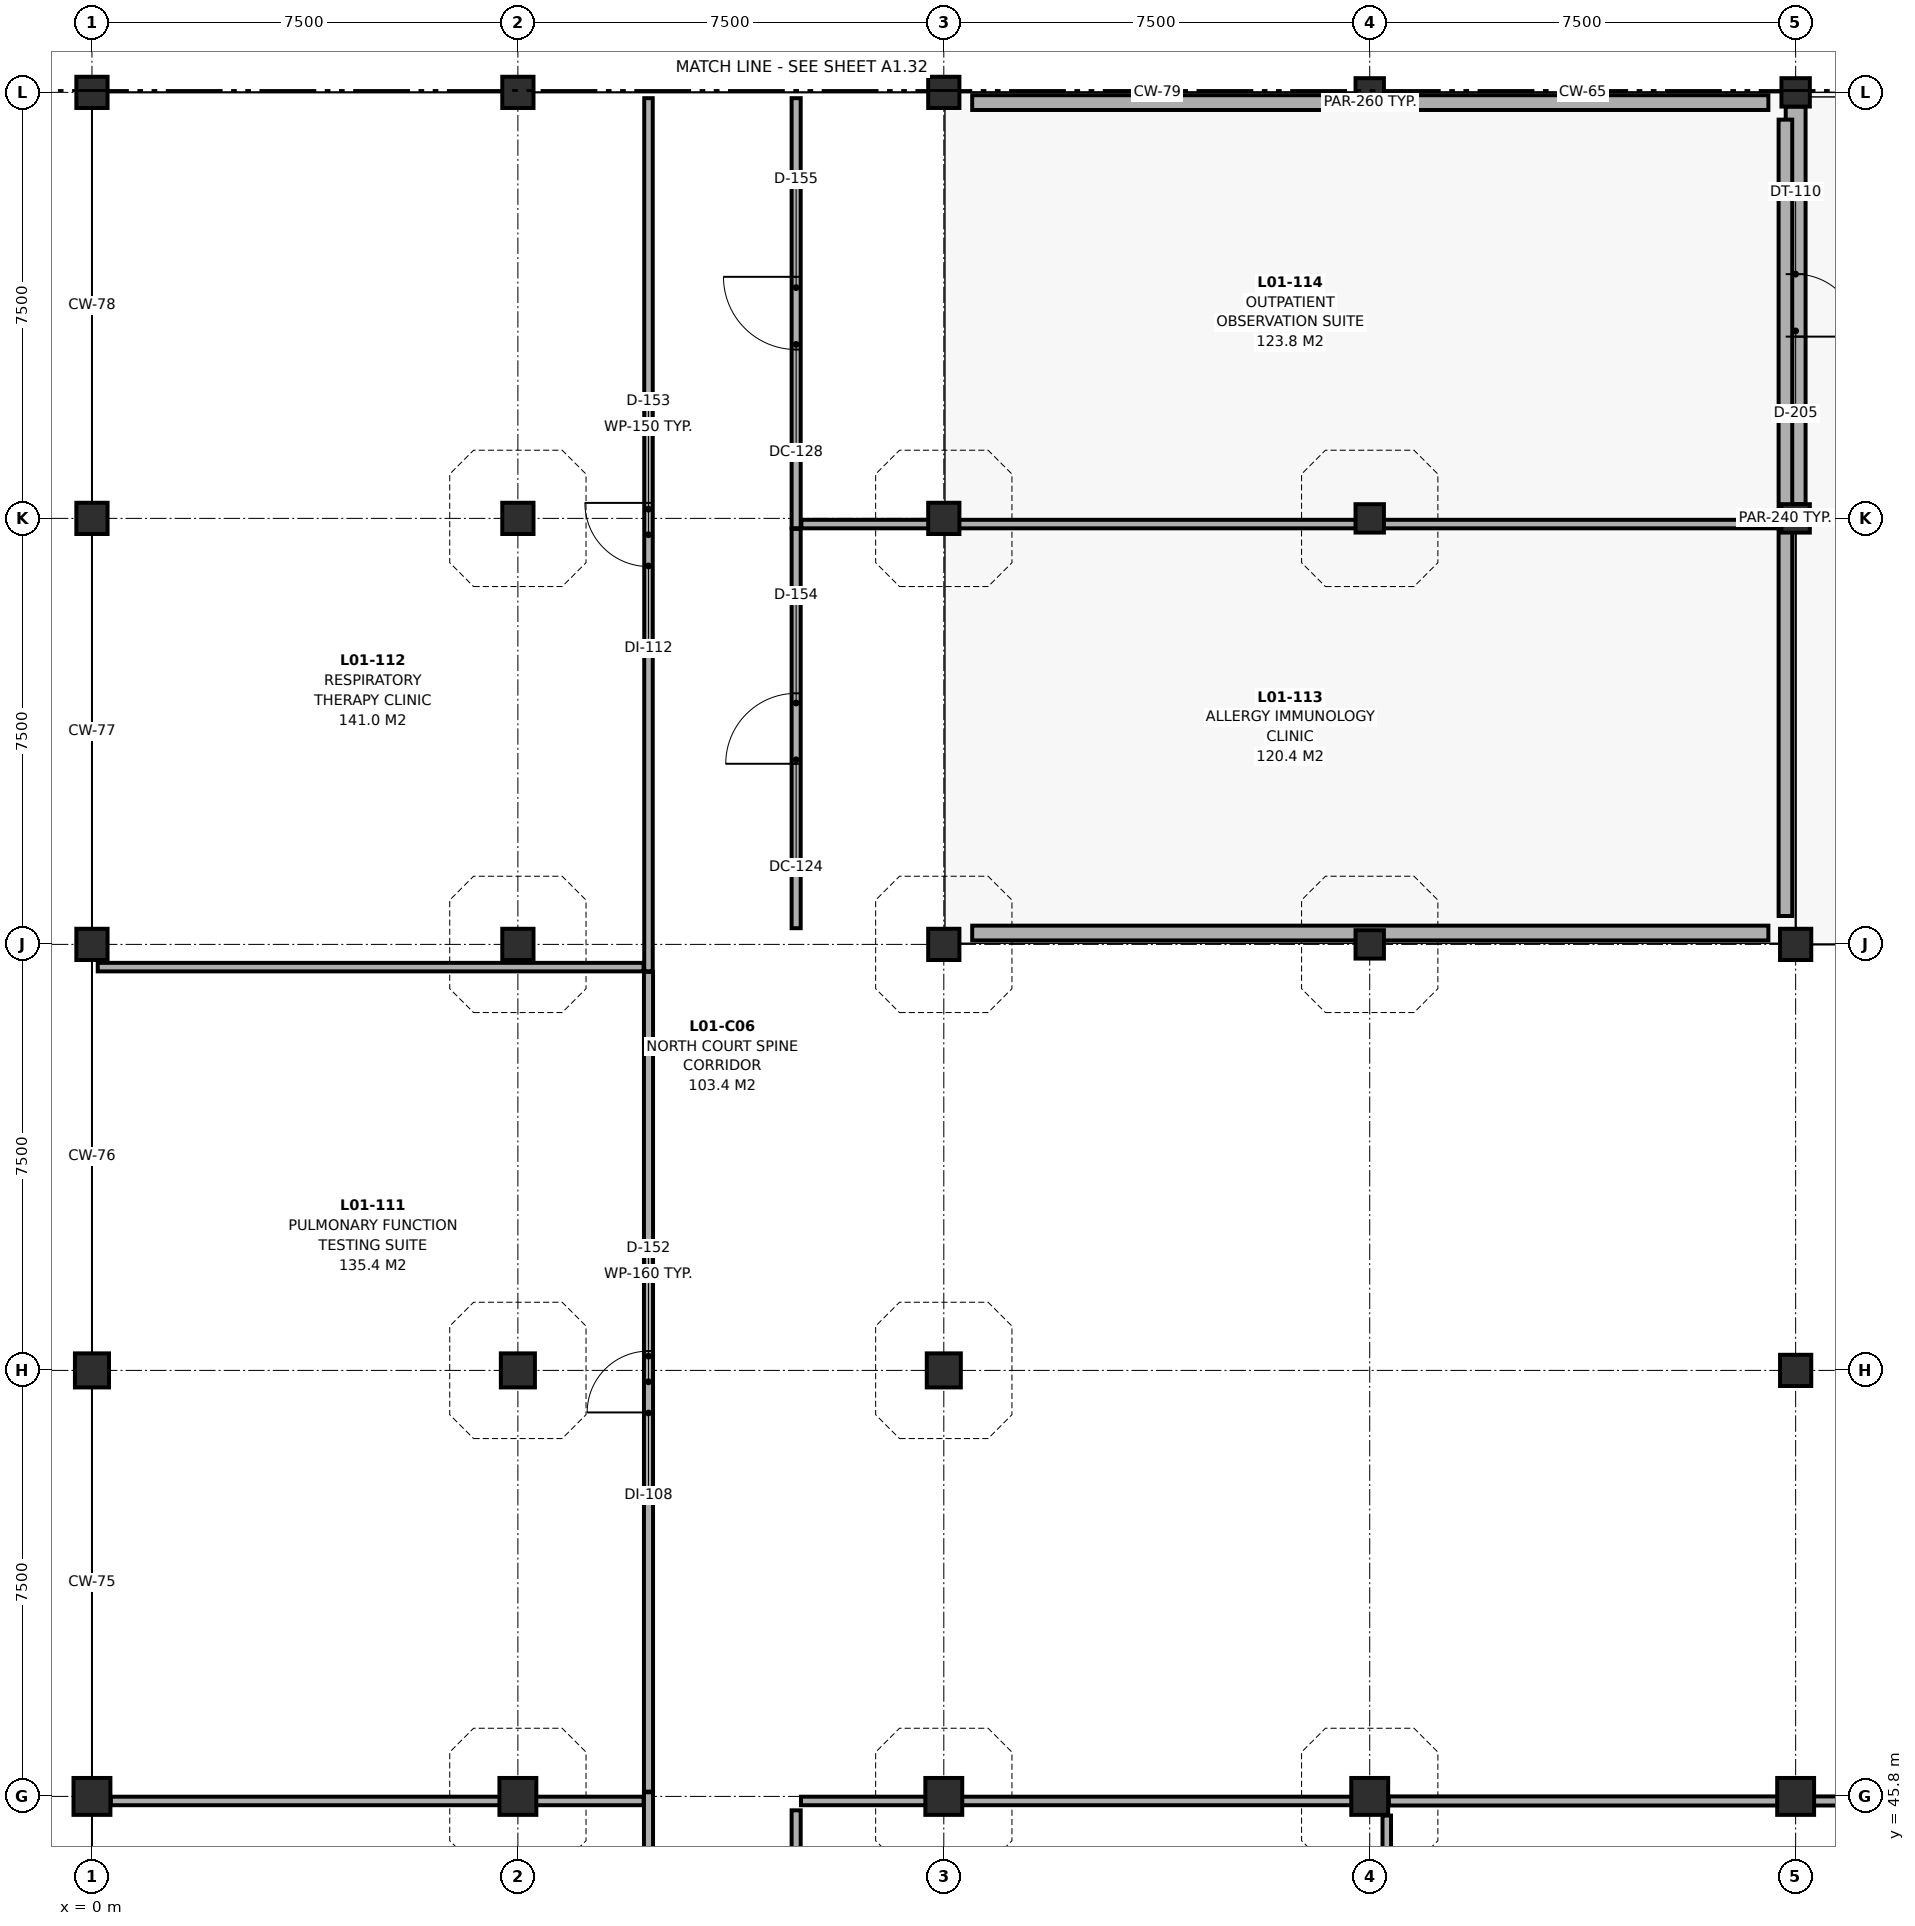
"""IFC4 building model, lengths in metres.
Left out: names, types, materials, properties, quantities, classifications, styles, units other than length and angle.
Written with IfcOpenShell. Run it as: python <this file> out.ifc"""

import sys

from ifc_helpers import new_model, si_unit, direction, frame, frame_2d, origin, origin_2d, place, context, subcontext, project, spatial, rectangle, extrude, element, fill, save


model = new_model("IFC4")
c1 = context("Model", 3, precision=1e-05, world=origin(), true_north=direction((0.0, 1.0)))
c2 = subcontext(c1, "Body", "Model", "MODEL_VIEW")
j1 = project(units=[si_unit("LENGTHUNIT", "METRE"), si_unit("PLANEANGLEUNIT", "RADIAN")], contexts=[c1])
p1 = place(None, origin())
s1 = spatial("IfcSite", under=j1, at=p1, CompositionType="ELEMENT")
p2 = place(p1, origin())
s2 = spatial("IfcBuilding", under=s1, at=p2, CompositionType="ELEMENT")
p3 = place(p2, frame((0.0, 0.0, 5.0)))
s3 = spatial("IfcBuildingStorey", under=s2, at=p3, CompositionType="ELEMENT", Elevation=5.0)
p4 = place(p3, frame((0.0, 45.8, 0.0), z_axis=(0.0, 0.0, 1.0), x_axis=(1.0, 0.0, 0.0)))
e1 = element("IfcColumn", 1, at=p4, inside=s3, PredefinedType="COLUMN", context=c2, shape_type="SweptSolid", body=[
    extrude(rectangle(XDim=0.65, YDim=0.65, at=origin_2d()), origin(), (0.0, 0.0, 1.0), 4.2),
])
p5 = place(p3, frame((0.0, 53.3, 0.0), z_axis=(0.0, 0.0, 1.0), x_axis=(1.0, 0.0, 0.0)))
e2 = element("IfcColumn", 2, at=p5, inside=s3, PredefinedType="COLUMN", context=c2, shape_type="SweptSolid", body=[
    extrude(rectangle(XDim=0.6, YDim=0.6, at=origin_2d()), origin(), (0.0, 0.0, 1.0), 4.2),
])
p6 = place(p3, frame((0.0, 60.8, 0.0), z_axis=(0.0, 0.0, 1.0), x_axis=(1.0, 0.0, 0.0)))
e3 = element("IfcColumn", 3, at=p6, inside=s3, PredefinedType="COLUMN", context=c2, shape_type="SweptSolid", body=[
    extrude(rectangle(XDim=0.55, YDim=0.55, at=origin_2d()), origin(), (0.0, 0.0, 1.0), 4.2),
])
for number, where, z_axis, x_axis in (
    (4, (0.0, 68.3, 0.0), (0.0, 0.0, 1.0), (1.0, 0.0, 0.0)),
    (5, (0.0, 75.8, 0.0), (0.0, 0.0, 1.0), (1.0, 0.0, 0.0)),
):
    element("IfcColumn", number, at=place(p3, frame(where, z_axis=z_axis, x_axis=x_axis)), inside=s3, PredefinedType="COLUMN", context=c2, shape_type="SweptSolid", body=[
        extrude(rectangle(XDim=0.55, YDim=0.55, at=origin_2d()), origin(), (0.0, 0.0, 1.0), 4.25),
    ])
p7 = place(p3, frame((7.5, 45.8, 0.0), z_axis=(0.0, 0.0, 1.0), x_axis=(1.0, 0.0, 0.0)))
e6 = element("IfcColumn", 6, at=p7, inside=s3, PredefinedType="COLUMN", context=c2, shape_type="SweptSolid", body=[
    extrude(rectangle(XDim=0.65, YDim=0.65, at=origin_2d()), origin(), (0.0, 0.0, 1.0), 4.2),
])
p8 = place(p3, frame((7.5, 53.3, 0.0), z_axis=(0.0, 0.0, 1.0), x_axis=(1.0, 0.0, 0.0)))
e7 = element("IfcColumn", 7, at=p8, inside=s3, PredefinedType="COLUMN", context=c2, shape_type="SweptSolid", body=[
    extrude(rectangle(XDim=0.6, YDim=0.6, at=origin_2d()), origin(), (0.0, 0.0, 1.0), 4.2),
])
p9 = place(p3, frame((7.5, 60.8, 0.0), z_axis=(0.0, 0.0, 1.0), x_axis=(1.0, 0.0, 0.0)))
e8 = element("IfcColumn", 8, at=p9, inside=s3, PredefinedType="COLUMN", context=c2, shape_type="SweptSolid", body=[
    extrude(rectangle(XDim=0.55, YDim=0.55, at=origin_2d()), origin(), (0.0, 0.0, 1.0), 4.2),
])
for number, where, z_axis, x_axis in (
    (9, (7.5, 68.3, 0.0), (0.0, 0.0, 1.0), (1.0, 0.0, 0.0)),
    (10, (7.5, 75.8, 0.0), (0.0, 0.0, 1.0), (1.0, 0.0, 0.0)),
):
    element("IfcColumn", number, at=place(p3, frame(where, z_axis=z_axis, x_axis=x_axis)), inside=s3, PredefinedType="COLUMN", context=c2, shape_type="SweptSolid", body=[
        extrude(rectangle(XDim=0.55, YDim=0.55, at=origin_2d()), origin(), (0.0, 0.0, 1.0), 4.25),
    ])
p10 = place(p3, frame((15.0, 45.8, 0.0), z_axis=(0.0, 0.0, 1.0), x_axis=(1.0, 0.0, 0.0)))
e11 = element("IfcColumn", 11, at=p10, inside=s3, PredefinedType="COLUMN", context=c2, shape_type="SweptSolid", body=[
    extrude(rectangle(XDim=0.65, YDim=0.65, at=origin_2d()), origin(), (0.0, 0.0, 1.0), 4.2),
])
p11 = place(p3, frame((15.0, 53.3, 0.0), z_axis=(0.0, 0.0, 1.0), x_axis=(1.0, 0.0, 0.0)))
e12 = element("IfcColumn", 12, at=p11, inside=s3, PredefinedType="COLUMN", context=c2, shape_type="SweptSolid", body=[
    extrude(rectangle(XDim=0.6, YDim=0.6, at=origin_2d()), origin(), (0.0, 0.0, 1.0), 4.2),
])
p12 = place(p3, frame((15.0, 60.8, 0.0), z_axis=(0.0, 0.0, 1.0), x_axis=(1.0, 0.0, 0.0)))
e13 = element("IfcColumn", 13, at=p12, inside=s3, PredefinedType="COLUMN", context=c2, shape_type="SweptSolid", body=[
    extrude(rectangle(XDim=0.55, YDim=0.55, at=origin_2d()), origin(), (0.0, 0.0, 1.0), 4.2),
])
for number, where, z_axis, x_axis in (
    (14, (15.0, 68.3, 0.0), (0.0, 0.0, 1.0), (1.0, 0.0, 0.0)),
    (15, (15.0, 75.8, 0.0), (0.0, 0.0, 1.0), (1.0, 0.0, 0.0)),
):
    element("IfcColumn", number, at=place(p3, frame(where, z_axis=z_axis, x_axis=x_axis)), inside=s3, PredefinedType="COLUMN", context=c2, shape_type="SweptSolid", body=[
        extrude(rectangle(XDim=0.55, YDim=0.55, at=origin_2d()), origin(), (0.0, 0.0, 1.0), 4.25),
    ])
p13 = place(p3, frame((22.5, 45.8, 0.0), z_axis=(0.0, 0.0, 1.0), x_axis=(1.0, 0.0, 0.0)))
e16 = element("IfcColumn", 16, at=p13, inside=s3, PredefinedType="COLUMN", context=c2, shape_type="SweptSolid", body=[
    extrude(rectangle(XDim=0.65, YDim=0.65, at=origin_2d()), origin(), (0.0, 0.0, 1.0), 4.2),
])
for number, where, z_axis, x_axis in (
    (17, (22.5, 60.8, 0.0), (0.0, 0.0, 1.0), (1.0, 0.0, 0.0)),
    (18, (22.5, 68.3, 0.0), (0.0, 0.0, 1.0), (1.0, 0.0, 0.0)),
    (19, (22.5, 75.8, 0.0), (0.0, 0.0, 1.0), (1.0, 0.0, 0.0)),
):
    element("IfcColumn", number, at=place(p3, frame(where, z_axis=z_axis, x_axis=x_axis)), inside=s3, PredefinedType="COLUMN", context=c2, shape_type="SweptSolid", body=[
        extrude(rectangle(XDim=0.5, YDim=0.5, at=origin_2d()), origin(), (0.0, 0.0, 1.0), 4.2),
    ])
p14 = place(p3, frame((30.0, 45.8, 0.0), z_axis=(0.0, 0.0, 1.0), x_axis=(1.0, 0.0, 0.0)))
e20 = element("IfcColumn", 20, at=p14, inside=s3, PredefinedType="COLUMN", context=c2, shape_type="SweptSolid", body=[
    extrude(rectangle(XDim=0.65, YDim=0.65, at=origin_2d()), origin(), (0.0, 0.0, 1.0), 4.2),
])
for number, where, z_axis, x_axis in (
    (21, (30.0, 53.3, 0.0), (0.0, 0.0, 1.0), (1.0, 0.0, 0.0)),
    (22, (30.0, 60.8, 0.0), (0.0, 0.0, 1.0), (1.0, 0.0, 0.0)),
):
    element("IfcColumn", number, at=place(p3, frame(where, z_axis=z_axis, x_axis=x_axis)), inside=s3, PredefinedType="COLUMN", context=c2, shape_type="SweptSolid", body=[
        extrude(rectangle(XDim=0.55, YDim=0.55, at=origin_2d()), origin(), (0.0, 0.0, 1.0), 4.2),
    ])
for number, where, z_axis, x_axis in (
    (23, (30.0, 68.3, 0.0), (0.0, 0.0, 1.0), (1.0, 0.0, 0.0)),
    (24, (30.0, 75.8, 0.0), (0.0, 0.0, 1.0), (1.0, 0.0, 0.0)),
):
    element("IfcColumn", number, at=place(p3, frame(where, z_axis=z_axis, x_axis=x_axis)), inside=s3, PredefinedType="COLUMN", context=c2, shape_type="SweptSolid", body=[
        extrude(rectangle(XDim=0.5, YDim=0.5, at=origin_2d()), origin(), (0.0, 0.0, 1.0), 4.2),
    ])
p15 = place(p3, frame((30.0, 75.55, 0.0), z_axis=(0.0, 0.0, 1.0), x_axis=(0.0, -1.0, 0.0)))
e25 = element("IfcWall", 25, at=p15, inside=s3, PredefinedType="SOLIDWALL", context=c2, shape_type="SweptSolid", body=[
    extrude(rectangle(XDim=7.0, YDim=0.35, at=frame_2d((3.5, 0.0))), origin(), (0.0, 0.0, 1.0), 4.2),
])
p16 = place(p15, frame((2.95, 0.0, 0.0)))
e26 = element("IfcOpeningElement", 26, at=p16, cuts=e25, PredefinedType="OPENING", context=c2, shape_type="SweptSolid", body=[
    extrude(rectangle(XDim=1.1, YDim=2.15, at=frame_2d((0.55, 1.075))), frame((0.0, 0.187, 0.0), z_axis=(0.0, -1.0, 0.0), x_axis=(1.0, 0.0, 0.0)), (0.0, 0.0, 1.0), 0.374),
])
p17 = place(p3, frame((15.5, 75.62, 4.4), z_axis=(0.0, 0.0, 1.0), x_axis=(1.0, 0.0, 0.0)))
e27 = element("IfcWall", 27, at=p17, inside=s3, PredefinedType="PARAPET", context=c2, shape_type="SweptSolid", body=[
    extrude(rectangle(XDim=14.02, YDim=0.26, at=frame_2d((7.01, 0.0))), origin(), (0.0, 0.0, 1.0), 0.6),
])
p18 = place(p3, frame((29.82, 75.32, 4.4), z_axis=(0.0, 0.0, 1.0), x_axis=(0.0, -1.0, 0.0)))
e28 = element("IfcWall", 28, at=p18, inside=s3, PredefinedType="PARAPET", context=c2, shape_type="SweptSolid", body=[
    extrude(rectangle(XDim=14.02, YDim=0.24, at=frame_2d((7.01, 0.0))), origin(), (0.0, 0.0, 1.0), 0.6),
])
p19 = place(p3, frame((29.52, 61.0, 4.4), z_axis=(0.0, 0.0, 1.0), x_axis=(-1.0, 0.0, 0.0)))
e29 = element("IfcWall", 29, at=p19, inside=s3, PredefinedType="PARAPET", context=c2, shape_type="SweptSolid", body=[
    extrude(rectangle(XDim=14.02, YDim=0.26, at=frame_2d((7.01, 0.0))), origin(), (0.0, 0.0, 1.0), 0.6),
])
p20 = place(p3, frame((9.8, 45.885, 0.0), z_axis=(0.0, 0.0, 1.0), x_axis=(0.0, 1.0, 0.0)))
e30 = element("IfcWall", 30, at=p20, inside=s3, PredefinedType="PARTITIONING", context=c2, shape_type="SweptSolid", body=[
    extrude(rectangle(XDim=14.43, YDim=0.16, at=frame_2d((7.215, 0.0))), origin(), (0.0, 0.0, 1.0), 3.265),
])
p21 = place(p20, frame((6.675, 0.0, 0.0)))
e31 = element("IfcOpeningElement", 31, at=p21, cuts=e30, PredefinedType="OPENING", context=c2, shape_type="SweptSolid", body=[
    extrude(rectangle(XDim=1.08, YDim=2.18, at=frame_2d((0.54, 1.09))), frame((0.0, 0.092, 0.0), z_axis=(0.0, -1.0, 0.0), x_axis=(1.0, 0.0, 0.0)), (0.0, 0.0, 1.0), 0.184),
])
p22 = place(p3, frame((9.8, 60.327, 0.0), z_axis=(0.0, 0.0, 1.0), x_axis=(0.0, 1.0, 0.0)))
e32 = element("IfcWall", 32, at=p22, inside=s3, PredefinedType="PARTITIONING", context=c2, shape_type="SweptSolid", body=[
    extrude(rectangle(XDim=15.371, YDim=0.15, at=frame_2d((7.686, 0.0))), origin(), (0.0, 0.0, 1.0), 3.265),
])
p23 = place(p22, frame((7.125, 0.0, 0.0)))
e33 = element("IfcOpeningElement", 33, at=p23, cuts=e32, PredefinedType="OPENING", context=c2, shape_type="SweptSolid", body=[
    extrude(rectangle(XDim=1.12, YDim=2.2, at=frame_2d((0.56, 1.1))), frame((0.0, 0.087, 0.0), z_axis=(0.0, -1.0, 0.0), x_axis=(1.0, 0.0, 0.0)), (0.0, 0.0, 1.0), 0.174),
])
p24 = place(p3, frame((12.4, 61.085, 0.0), z_axis=(0.0, 0.0, 1.0), x_axis=(0.0, 1.0, 0.0)))
e34 = element("IfcWall", 34, at=p24, inside=s3, PredefinedType="PARTITIONING", context=c2, shape_type="SweptSolid", body=[
    extrude(rectangle(XDim=7.03, YDim=0.16, at=frame_2d((3.515, 0.0))), origin(), (0.0, 0.0, 1.0), 3.265),
])
p25 = place(p24, frame((2.895, 0.0, 0.0)))
e35 = element("IfcOpeningElement", 35, at=p25, cuts=e34, PredefinedType="OPENING", context=c2, shape_type="SweptSolid", body=[
    extrude(rectangle(XDim=1.24, YDim=2.2, at=frame_2d((0.62, 1.1))), frame((0.0, 0.092, 0.0), z_axis=(0.0, -1.0, 0.0), x_axis=(1.0, 0.0, 0.0)), (0.0, 0.0, 1.0), 0.184),
])
p26 = place(p3, frame((12.4, 68.127, 0.0), z_axis=(0.0, 0.0, 1.0), x_axis=(0.0, 1.0, 0.0)))
e36 = element("IfcWall", 36, at=p26, inside=s3, PredefinedType="PARTITIONING", context=c2, shape_type="SweptSolid", body=[
    extrude(rectangle(XDim=7.571, YDim=0.16, at=frame_2d((3.786, 0.0))), origin(), (0.0, 0.0, 1.0), 3.315),
])
p27 = place(p26, frame((3.146, 0.0, 0.0)))
e37 = element("IfcOpeningElement", 37, at=p27, cuts=e36, PredefinedType="OPENING", context=c2, shape_type="SweptSolid", body=[
    extrude(rectangle(XDim=1.28, YDim=2.22, at=frame_2d((0.64, 1.11))), frame((0.0, 0.092, 0.0), z_axis=(0.0, -1.0, 0.0), x_axis=(1.0, 0.0, 0.0)), (0.0, 0.0, 1.0), 0.184),
])
p28 = place(p3, frame((0.332, 45.72, 0.0), z_axis=(0.0, 0.0, 1.0), x_axis=(1.0, 0.0, 0.0)))
e38 = element("IfcWall", 38, at=p28, inside=s3, PredefinedType="PARTITIONING", context=c2, shape_type="SweptSolid", body=[
    extrude(rectangle(XDim=9.383, YDim=0.15, at=frame_2d((4.691, 0.0))), origin(), (0.0, 0.0, 1.0), 3.265),
])
p29 = place(p3, frame((12.485, 45.72, 0.0), z_axis=(0.0, 0.0, 1.0), x_axis=(1.0, 0.0, 0.0)))
e39 = element("IfcWall", 39, at=p29, inside=s3, PredefinedType="PARTITIONING", context=c2, shape_type="SweptSolid", body=[
    extrude(rectangle(XDim=10.063, YDim=0.15, at=frame_2d((5.031, 0.0))), origin(), (0.0, 0.0, 1.0), 3.265),
])
p30 = place(p3, frame((22.837, 45.72, 0.0), z_axis=(0.0, 0.0, 1.0), x_axis=(1.0, 0.0, 0.0)))
e40 = element("IfcWall", 40, at=p30, inside=s3, PredefinedType="PARTITIONING", context=c2, shape_type="SweptSolid", body=[
    extrude(rectangle(XDim=10.878, YDim=0.16, at=frame_2d((5.439, 0.0))), origin(), (0.0, 0.0, 1.0), 3.265),
])
p31 = place(p3, frame((9.8, 35.965, 0.0), z_axis=(0.0, 0.0, 1.0), x_axis=(0.0, 1.0, 0.0)))
e41 = element("IfcWall", 41, at=p31, inside=s3, PredefinedType="PARTITIONING", context=c2, shape_type="SweptSolid", body=[
    extrude(rectangle(XDim=9.908, YDim=0.16, at=frame_2d((4.954, 0.0))), origin(), (0.0, 0.0, 1.0), 3.265),
])
p32 = place(p3, frame((12.4, 35.965, 0.0), z_axis=(0.0, 0.0, 1.0), x_axis=(0.0, 1.0, 0.0)))
e42 = element("IfcWall", 42, at=p32, inside=s3, PredefinedType="PARTITIONING", context=c2, shape_type="SweptSolid", body=[
    extrude(rectangle(XDim=9.59, YDim=0.16, at=frame_2d((4.795, 0.0))), origin(), (0.0, 0.0, 1.0), 3.265),
])
p33 = place(p3, frame((22.8, 35.875, 0.0), z_axis=(0.0, 0.0, 1.0), x_axis=(0.0, 1.0, 0.0)))
e43 = element("IfcWall", 43, at=p33, inside=s3, PredefinedType="PARTITIONING", context=c2, shape_type="SweptSolid", body=[
    extrude(rectangle(XDim=9.588, YDim=0.15, at=frame_2d((4.794, 0.0))), origin(), (0.0, 0.0, 1.0), 3.265),
])
p34 = place(p3, frame((0.102, 60.4, 0.0), z_axis=(0.0, 0.0, 1.0), x_axis=(1.0, 0.0, 0.0)))
e44 = element("IfcWall", 44, at=p34, inside=s3, PredefinedType="PARTITIONING", context=c2, shape_type="SweptSolid", body=[
    extrude(rectangle(XDim=9.611, YDim=0.15, at=frame_2d((4.805, 0.0))), origin(), (0.0, 0.0, 1.0), 3.265),
])
p35 = place(p3, frame((12.492, 68.2, 0.0), z_axis=(0.0, 0.0, 1.0), x_axis=(1.0, 0.0, 0.0)))
e45 = element("IfcWall", 45, at=p35, inside=s3, PredefinedType="PARTITIONING", context=c2, shape_type="SweptSolid", body=[
    extrude(rectangle(XDim=17.196, YDim=0.15, at=frame_2d((8.598, 0.0))), origin(), (0.0, 0.0, 1.0), 3.315),
])
p36 = place(p16, origin())
e46 = element("IfcDoor", 46, at=p36, inside=s3, OperationType="SINGLE_SWING_RIGHT", PredefinedType="DOOR", context=c2, shape_type="SweptSolid", body=[
    extrude(rectangle(XDim=1.1, YDim=2.15, at=frame_2d((0.55, 1.075))), frame((0.0, 0.025, 0.0), z_axis=(0.0, -1.0, 0.0), x_axis=(1.0, 0.0, 0.0)), (0.0, 0.0, 1.0), 0.05),
])
fill(e26, e46)
p37 = place(p21, origin())
e47 = element("IfcDoor", 47, at=p37, inside=s3, OperationType="SINGLE_SWING_LEFT", PredefinedType="DOOR", context=c2, shape_type="SweptSolid", body=[
    extrude(rectangle(XDim=1.08, YDim=2.18, at=frame_2d((0.54, 1.09))), frame((0.0, 0.025, 0.0), z_axis=(0.0, -1.0, 0.0), x_axis=(1.0, 0.0, 0.0)), (0.0, 0.0, 1.0), 0.05),
])
fill(e31, e47)
p38 = place(p23, origin())
e48 = element("IfcDoor", 48, at=p38, inside=s3, OperationType="SINGLE_SWING_RIGHT", PredefinedType="DOOR", context=c2, shape_type="SweptSolid", body=[
    extrude(rectangle(XDim=1.12, YDim=2.2, at=frame_2d((0.56, 1.1))), frame((0.0, 0.025, 0.0), z_axis=(0.0, -1.0, 0.0), x_axis=(1.0, 0.0, 0.0)), (0.0, 0.0, 1.0), 0.05),
])
fill(e33, e48)
p39 = place(p25, origin())
e49 = element("IfcDoor", 49, at=p39, inside=s3, OperationType="SINGLE_SWING_LEFT", PredefinedType="DOOR", context=c2, shape_type="SweptSolid", body=[
    extrude(rectangle(XDim=1.24, YDim=2.2, at=frame_2d((0.62, 1.1))), frame((0.0, 0.025, 0.0), z_axis=(0.0, -1.0, 0.0), x_axis=(1.0, 0.0, 0.0)), (0.0, 0.0, 1.0), 0.05),
])
fill(e35, e49)
p40 = place(p27, origin())
e50 = element("IfcDoor", 50, at=p40, inside=s3, OperationType="SINGLE_SWING_RIGHT", PredefinedType="DOOR", context=c2, shape_type="SweptSolid", body=[
    extrude(rectangle(XDim=1.28, YDim=2.22, at=frame_2d((0.64, 1.11))), frame((0.0, 0.025, 0.0), z_axis=(0.0, -1.0, 0.0), x_axis=(1.0, 0.0, 0.0)), (0.0, 0.0, 1.0), 0.05),
])
fill(e37, e50)
save(model, sys.argv[1])
